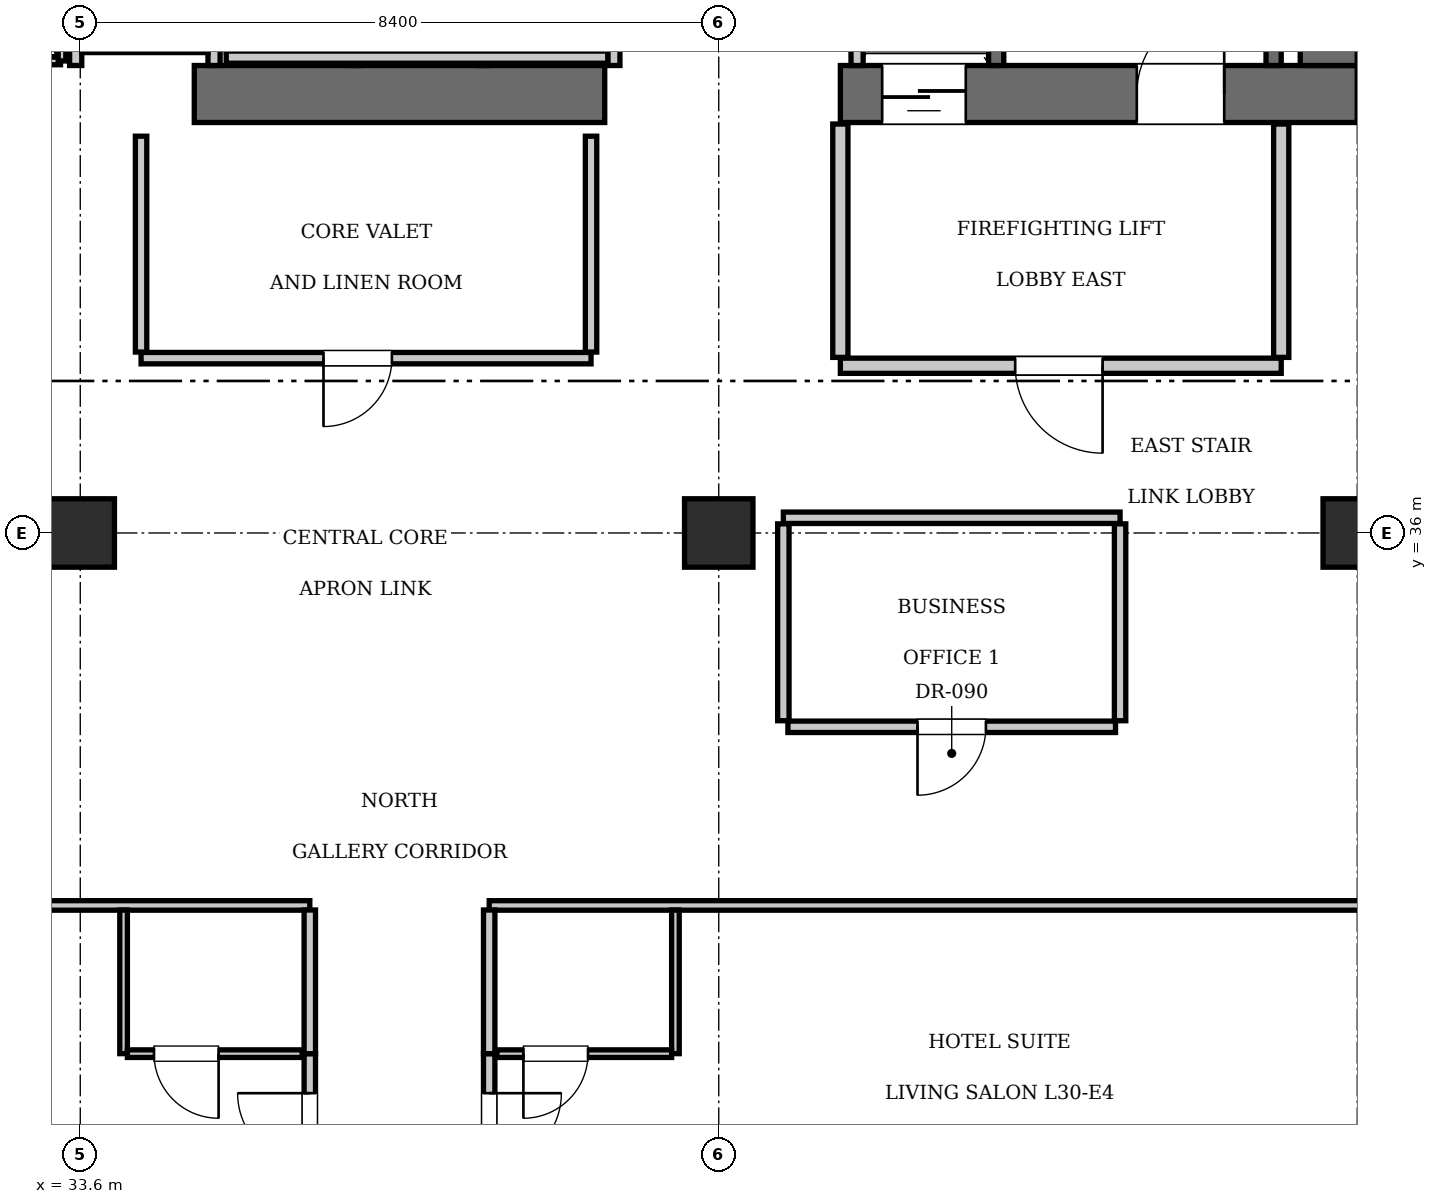
"""IFC4 building model, lengths in metres.
Left out: names, types, materials, properties, quantities, classifications, styles, units other than length and angle.
Written with IfcOpenShell. Run it as: python <this file> out.ifc"""

import sys

from ifc_helpers import new_model, si_unit, direction, frame, frame_2d, origin, origin_2d, place, context, subcontext, project, spatial, rectangle, extrude, element, fill, save


model = new_model("IFC4")
c1 = context("Model", 3, precision=1e-05, world=origin(), true_north=direction((0.0, 1.0)))
c2 = subcontext(c1, "Body", "Model", "MODEL_VIEW")
j1 = project(units=[si_unit("LENGTHUNIT", "METRE"), si_unit("PLANEANGLEUNIT", "RADIAN")], contexts=[c1])
p1 = place(None, origin())
s1 = spatial("IfcSite", under=j1, at=p1, CompositionType="ELEMENT")
p2 = place(p1, origin())
s2 = spatial("IfcBuilding", under=s1, at=p2, CompositionType="ELEMENT")
p3 = place(p2, frame((0.0, 0.0, 127.4)))
s3 = spatial("IfcBuildingStorey", under=s2, at=p3, CompositionType="ELEMENT", Elevation=127.4)
p4 = place(p3, frame((35.1, 41.775, 0.0), z_axis=(0.0, 0.0, 1.0), x_axis=(1.0, 0.0, 0.0)))
e1 = element("IfcWall", 1, at=p4, inside=s3, PredefinedType="SHEAR", context=c2, shape_type="SweptSolid", body=[
    extrude(rectangle(XDim=5.4, YDim=0.75, at=frame_2d((2.7, 0.0))), origin(), (0.0, 0.0, 1.0), 3.85),
])
p5 = place(p3, frame((43.6, 41.775, 0.0), z_axis=(0.0, 0.0, 1.0), x_axis=(1.0, 0.0, 0.0)))
e2 = element("IfcWall", 2, at=p5, inside=s3, PredefinedType="SHEAR", context=c2, shape_type="SweptSolid", body=[
    extrude(rectangle(XDim=6.8, YDim=0.75, at=frame_2d((3.4, 0.0))), origin(), (0.0, 0.0, 1.0), 3.85),
])
p6 = place(p5, frame((3.9, 0.0, 0.0)))
e3 = element("IfcOpeningElement", 3, at=p6, cuts=e2, PredefinedType="OPENING", context=c2, shape_type="SweptSolid", body=[
    extrude(rectangle(XDim=1.15, YDim=2.15, at=frame_2d((0.575, 1.075))), frame((0.0, 0.385, 0.0), z_axis=(0.0, -1.0, 0.0), x_axis=(1.0, 0.0, 0.0)), (0.0, 0.0, 1.0), 0.77),
])
p7 = place(p5, frame((0.55, 0.0, 0.0)))
e4 = element("IfcOpeningElement", 4, at=p7, cuts=e2, PredefinedType="OPENING", context=c2, shape_type="SweptSolid", body=[
    extrude(rectangle(XDim=1.1, YDim=2.2, at=frame_2d((0.55, 1.1))), frame((0.0, 0.385, 0.0), z_axis=(0.0, -1.0, 0.0), x_axis=(1.0, 0.0, 0.0)), (0.0, 0.0, 1.0), 0.77),
])
p8 = place(p3, frame((50.025, 42.15, 0.0), z_axis=(0.0, 0.0, 1.0), x_axis=(0.0, 1.0, 0.0)))
e5 = element("IfcWall", 5, at=p8, inside=s3, PredefinedType="SHEAR", context=c2, shape_type="SweptSolid", body=[
    extrude(rectangle(XDim=1.9, YDim=0.75, at=frame_2d((0.95, 0.0))), origin(), (0.0, 0.0, 1.0), 3.85),
])
for number, where, z_axis, x_axis in (
    (6, (33.6, 36.0, 0.0), (0.0, 0.0, 1.0), (1.0, 0.0, 0.0)),
    (7, (42.0, 36.0, 0.0), (0.0, 0.0, 1.0), (1.0, 0.0, 0.0)),
    (8, (50.4, 36.0, 0.0), (0.0, 0.0, 1.0), (1.0, 0.0, 0.0)),
):
    element("IfcColumn", number, at=place(p3, frame(where, z_axis=z_axis, x_axis=x_axis)), inside=s3, PredefinedType="COLUMN", context=c2, shape_type="SweptSolid", body=[
        extrude(rectangle(XDim=0.9, YDim=0.9, at=origin_2d()), origin(), (0.0, 0.0, 1.0), 3.85),
    ])
p9 = place(p3, frame((45.65, 42.15, 0.0), z_axis=(0.0, 0.0, 1.0), x_axis=(0.0, 1.0, 0.0)))
e9 = element("IfcWall", 9, at=p9, inside=s3, PredefinedType="SOLIDWALL", context=c2, shape_type="SweptSolid", body=[
    extrude(rectangle(XDim=9.0, YDim=0.2, at=frame_2d((4.5, 0.0))), origin(), (0.0, 0.0, 1.0), 3.61),
])
p10 = place(p3, frame((49.3, 42.15, 0.0), z_axis=(0.0, 0.0, 1.0), x_axis=(0.0, 1.0, 0.0)))
e10 = element("IfcWall", 10, at=p10, inside=s3, PredefinedType="SOLIDWALL", context=c2, shape_type="SweptSolid", body=[
    extrude(rectangle(XDim=1.87, YDim=0.2, at=frame_2d((0.935, 0.0))), origin(), (0.0, 0.0, 1.0), 3.61),
])
p11 = place(p3, frame((43.82, 42.15, 0.0), z_axis=(0.0, 0.0, 1.0), x_axis=(0.0, 1.0, 0.0)))
e11 = element("IfcWall", 11, at=p11, inside=s3, PredefinedType="SOLIDWALL", context=c2, shape_type="SweptSolid", body=[
    extrude(rectangle(XDim=2.59, YDim=0.16, at=frame_2d((1.295, 0.0))), origin(), (0.0, 0.0, 1.0), 3.61),
])
for number, where, z_axis, x_axis in (
    (12, (37.2, 42.15, 0.0), (0.0, 0.0, 1.0), (0.0, 1.0, 0.0)),
    (13, (38.9, 42.15, 0.0), (0.0, 0.0, 1.0), (0.0, 1.0, 0.0)),
    (14, (40.62, 42.15, 0.0), (0.0, 0.0, 1.0), (0.0, 1.0, 0.0)),
):
    element("IfcWall", number, at=place(p3, frame(where, z_axis=z_axis, x_axis=x_axis)), inside=s3, PredefinedType="SOLIDWALL", context=c2, shape_type="SweptSolid", body=[
        extrude(rectangle(XDim=2.2, YDim=0.16, at=frame_2d((1.1, 0.0))), origin(), (0.0, 0.0, 1.0), 3.61),
    ])
p12 = place(p3, frame((35.52, 42.26, 0.0), z_axis=(0.0, 0.0, 1.0), x_axis=(1.0, 0.0, 0.0)))
e15 = element("IfcWall", 15, at=p12, inside=s3, PredefinedType="SOLIDWALL", context=c2, shape_type="SweptSolid", body=[
    extrude(rectangle(XDim=5.02, YDim=0.16, at=frame_2d((2.51, 0.0))), origin(), (0.0, 0.0, 1.0), 3.61),
])
for number, where, z_axis, x_axis in (
    (16, (33.54, 42.15, 0.0), (0.0, 0.0, 1.0), (0.0, 1.0, 0.0)),
    (17, (35.36, 42.15, 0.0), (0.0, 0.0, 1.0), (0.0, 1.0, 0.0)),
):
    element("IfcWall", number, at=place(p3, frame(where, z_axis=z_axis, x_axis=x_axis)), inside=s3, PredefinedType="SOLIDWALL", context=c2, shape_type="SweptSolid", body=[
        extrude(rectangle(XDim=2.25, YDim=0.16, at=frame_2d((1.125, 0.0))), origin(), (0.0, 0.0, 1.0), 3.61),
    ])
p13 = place(p3, frame((33.62, 42.4, 0.0), z_axis=(0.0, 0.0, 1.0), x_axis=(1.0, 0.0, 0.0)))
e18 = element("IfcWall", 18, at=p13, inside=s3, PredefinedType="SOLIDWALL", context=c2, shape_type="SweptSolid", body=[
    extrude(rectangle(XDim=1.66, YDim=0.16, at=frame_2d((0.83, 0.0))), origin(), (0.0, 0.0, 1.0), 3.61),
])
p14 = place(p3, frame((43.6, 38.2, 0.0), z_axis=(0.0, 0.0, 1.0), x_axis=(1.0, 0.0, 0.0)))
e19 = element("IfcWall", 19, at=p14, inside=s3, PredefinedType="PARTITIONING", context=c2, shape_type="SweptSolid", body=[
    extrude(rectangle(XDim=5.8, YDim=0.2, at=frame_2d((2.9, 0.0))), origin(), (0.0, 0.0, 1.0), 3.61),
])
p15 = place(p14, frame((2.3, 0.0, 0.0)))
e20 = element("IfcOpeningElement", 20, at=p15, cuts=e19, PredefinedType="OPENING", context=c2, shape_type="SweptSolid", body=[
    extrude(rectangle(XDim=1.15, YDim=2.15, at=frame_2d((0.575, 1.075))), frame((0.0, 0.11, 0.0), z_axis=(0.0, -1.0, 0.0), x_axis=(1.0, 0.0, 0.0)), (0.0, 0.0, 1.0), 0.22),
])
for number, where, z_axis, x_axis in (
    (21, (43.6, 38.31, 0.0), (0.0, 0.0, 1.0), (0.0, 1.0, 0.0)),
    (22, (49.4, 38.31, 0.0), (0.0, 0.0, 1.0), (0.0, 1.0, 0.0)),
):
    element("IfcWall", number, at=place(p3, frame(where, z_axis=z_axis, x_axis=x_axis)), inside=s3, PredefinedType="PARTITIONING", context=c2, shape_type="SweptSolid", body=[
        extrude(rectangle(XDim=3.07, YDim=0.2, at=frame_2d((1.535, 0.0))), origin(), (0.0, 0.0, 1.0), 3.61),
    ])
p16 = place(p3, frame((32.02, 42.21, 0.0), z_axis=(0.0, 0.0, 1.0), x_axis=(1.0, 0.0, 0.0)))
e23 = element("IfcWall", 23, at=p16, inside=s3, PredefinedType="PARTITIONING", context=c2, shape_type="SweptSolid", body=[
    extrude(rectangle(XDim=1.32, YDim=0.1, at=frame_2d((0.66, 0.0))), origin(), (0.0, 0.0, 1.0), 3.61),
])
p17 = place(p16, frame((0.24, 0.0, 0.0)))
e24 = element("IfcOpeningElement", 24, at=p17, cuts=e23, PredefinedType="OPENING", context=c2, shape_type="SweptSolid", body=[
    extrude(rectangle(XDim=0.8, YDim=2.05, at=frame_2d((0.4, 1.025))), frame((0.0, 0.06, 0.0), z_axis=(0.0, -1.0, 0.0), x_axis=(1.0, 0.0, 0.0)), (0.0, 0.0, 1.0), 0.12),
])
p18 = place(p3, frame((33.36, 42.21, 0.0), z_axis=(0.0, 0.0, 1.0), x_axis=(0.0, 1.0, 0.0)))
e25 = element("IfcWall", 25, at=p18, inside=s3, PredefinedType="PARTITIONING", context=c2, shape_type="SweptSolid", body=[
    extrude(rectangle(XDim=2.73, YDim=0.1, at=frame_2d((1.365, 0.0))), origin(), (0.0, 0.0, 1.0), 3.61),
])
p19 = place(p3, frame((34.4, 38.3, 0.0), z_axis=(0.0, 0.0, 1.0), x_axis=(1.0, 0.0, 0.0)))
e26 = element("IfcWall", 26, at=p19, inside=s3, PredefinedType="PARTITIONING", context=c2, shape_type="SweptSolid", body=[
    extrude(rectangle(XDim=5.92, YDim=0.15, at=frame_2d((2.96, 0.0))), origin(), (0.0, 0.0, 1.0), 3.61),
])
p20 = place(p19, frame((2.4, 0.0, 0.0)))
e27 = element("IfcOpeningElement", 27, at=p20, cuts=e26, PredefinedType="OPENING", context=c2, shape_type="SweptSolid", body=[
    extrude(rectangle(XDim=0.9, YDim=2.1, at=frame_2d((0.45, 1.05))), frame((0.0, 0.085, 0.0), z_axis=(0.0, -1.0, 0.0), x_axis=(1.0, 0.0, 0.0)), (0.0, 0.0, 1.0), 0.17),
])
for number, where, z_axis, x_axis in (
    (28, (34.4, 38.38, 0.0), (0.0, 0.0, 1.0), (0.0, 1.0, 0.0)),
    (29, (40.32, 38.38, 0.0), (0.0, 0.0, 1.0), (0.0, 1.0, 0.0)),
):
    element("IfcWall", number, at=place(p3, frame(where, z_axis=z_axis, x_axis=x_axis)), inside=s3, PredefinedType="PARTITIONING", context=c2, shape_type="SweptSolid", body=[
        extrude(rectangle(XDim=2.84, YDim=0.15, at=frame_2d((1.42, 0.0))), origin(), (0.0, 0.0, 1.0), 3.61),
    ])
p21 = place(p3, frame((42.85, 36.2, 0.0), z_axis=(0.0, 0.0, 1.0), x_axis=(1.0, 0.0, 0.0)))
e30 = element("IfcWall", 30, at=p21, inside=s3, PredefinedType="PARTITIONING", context=c2, shape_type="SweptSolid", body=[
    extrude(rectangle(XDim=4.43, YDim=0.15, at=frame_2d((2.215, 0.0))), origin(), (0.0, 0.0, 1.0), 3.61),
])
for number, where, z_axis, x_axis in (
    (31, (42.85, 33.53, 0.0), (0.0, 0.0, 1.0), (0.0, 1.0, 0.0)),
    (32, (47.28, 33.53, 0.0), (0.0, 0.0, 1.0), (0.0, 1.0, 0.0)),
):
    element("IfcWall", number, at=place(p3, frame(where, z_axis=z_axis, x_axis=x_axis)), inside=s3, PredefinedType="PARTITIONING", context=c2, shape_type="SweptSolid", body=[
        extrude(rectangle(XDim=2.59, YDim=0.15, at=frame_2d((1.295, 0.0))), origin(), (0.0, 0.0, 1.0), 3.61),
    ])
p22 = place(p3, frame((42.91, 33.45, 0.0), z_axis=(0.0, 0.0, 1.0), x_axis=(1.0, 0.0, 0.0)))
e33 = element("IfcWall", 33, at=p22, inside=s3, PredefinedType="PARTITIONING", context=c2, shape_type="SweptSolid", body=[
    extrude(rectangle(XDim=4.31, YDim=0.15, at=frame_2d((2.155, 0.0))), origin(), (0.0, 0.0, 1.0), 3.61),
])
p23 = place(p22, frame((1.705, 0.0, 0.0)))
e34 = element("IfcOpeningElement", 34, at=p23, cuts=e33, PredefinedType="OPENING", context=c2, shape_type="SweptSolid", body=[
    extrude(rectangle(XDim=0.9, YDim=2.1, at=frame_2d((0.45, 1.05))), frame((0.0, 0.085, 0.0), z_axis=(0.0, -1.0, 0.0), x_axis=(1.0, 0.0, 0.0)), (0.0, 0.0, 1.0), 0.17),
])
p24 = place(p3, frame((13.2, 31.1, 0.0), z_axis=(0.0, 0.0, 1.0), x_axis=(1.0, 0.0, 0.0)))
e35 = element("IfcWall", 35, at=p24, inside=s3, PredefinedType="PARTITIONING", context=c2, shape_type="SweptSolid", body=[
    extrude(rectangle(XDim=23.42, YDim=0.125, at=frame_2d((11.71, 0.0))), origin(), (0.0, 0.0, 1.0), 3.61),
])
p25 = place(p3, frame((38.98, 31.1, 0.0), z_axis=(0.0, 0.0, 1.0), x_axis=(1.0, 0.0, 0.0)))
e36 = element("IfcWall", 36, at=p25, inside=s3, PredefinedType="PARTITIONING", context=c2, shape_type="SweptSolid", body=[
    extrude(rectangle(XDim=23.42, YDim=0.125, at=frame_2d((11.71, 0.0))), origin(), (0.0, 0.0, 1.0), 3.61),
])
p26 = place(p3, frame((36.62, 27.16, 0.0), z_axis=(0.0, 0.0, 1.0), x_axis=(0.0, 1.0, 0.0)))
e37 = element("IfcWall", 37, at=p26, inside=s3, PredefinedType="PARTITIONING", context=c2, shape_type="SweptSolid", body=[
    extrude(rectangle(XDim=1.99, YDim=0.15, at=frame_2d((0.995, 0.0))), origin(), (0.0, 0.0, 1.0), 3.61),
])
p27 = place(p26, frame((0.52, 0.0, 0.0)))
e38 = element("IfcOpeningElement", 38, at=p27, cuts=e37, PredefinedType="OPENING", context=c2, shape_type="SweptSolid", body=[
    extrude(rectangle(XDim=0.95, YDim=2.15, at=frame_2d((0.475, 1.075))), frame((0.0, 0.085, 0.0), z_axis=(0.0, -1.0, 0.0), x_axis=(1.0, 0.0, 0.0)), (0.0, 0.0, 1.0), 0.17),
])
p28 = place(p3, frame((36.62, 29.15, 0.0), z_axis=(0.0, 0.0, 1.0), x_axis=(0.0, 1.0, 0.0)))
e39 = element("IfcWall", 39, at=p28, inside=s3, PredefinedType="PARTITIONING", context=c2, shape_type="SweptSolid", body=[
    extrude(rectangle(XDim=1.89, YDim=0.15, at=frame_2d((0.945, 0.0))), origin(), (0.0, 0.0, 1.0), 3.61),
])
p29 = place(p3, frame((34.17, 29.15, 0.0), z_axis=(0.0, 0.0, 1.0), x_axis=(0.0, 1.0, 0.0)))
e40 = element("IfcWall", 40, at=p29, inside=s3, PredefinedType="PARTITIONING", context=c2, shape_type="SweptSolid", body=[
    extrude(rectangle(XDim=1.89, YDim=0.1, at=frame_2d((0.945, 0.0))), origin(), (0.0, 0.0, 1.0), 3.61),
])
p30 = place(p3, frame((34.22, 29.15, 0.0), z_axis=(0.0, 0.0, 1.0), x_axis=(1.0, 0.0, 0.0)))
e41 = element("IfcWall", 41, at=p30, inside=s3, PredefinedType="PARTITIONING", context=c2, shape_type="SweptSolid", body=[
    extrude(rectangle(XDim=2.3, YDim=0.1, at=frame_2d((1.15, 0.0))), origin(), (0.0, 0.0, 1.0), 3.61),
])
p31 = place(p30, frame((0.35, 0.0, 0.0)))
e42 = element("IfcOpeningElement", 42, at=p31, cuts=e41, PredefinedType="OPENING", context=c2, shape_type="SweptSolid", body=[
    extrude(rectangle(XDim=0.85, YDim=2.1, at=frame_2d((0.425, 1.05))), frame((0.0, 0.06, 0.0), z_axis=(0.0, -1.0, 0.0), x_axis=(1.0, 0.0, 0.0)), (0.0, 0.0, 1.0), 0.12),
])
p32 = place(p3, frame((38.98, 27.16, 0.0), z_axis=(0.0, 0.0, 1.0), x_axis=(0.0, 1.0, 0.0)))
e43 = element("IfcWall", 43, at=p32, inside=s3, PredefinedType="PARTITIONING", context=c2, shape_type="SweptSolid", body=[
    extrude(rectangle(XDim=1.99, YDim=0.15, at=frame_2d((0.995, 0.0))), origin(), (0.0, 0.0, 1.0), 3.61),
])
p33 = place(p32, frame((0.52, 0.0, 0.0)))
e44 = element("IfcOpeningElement", 44, at=p33, cuts=e43, PredefinedType="OPENING", context=c2, shape_type="SweptSolid", body=[
    extrude(rectangle(XDim=0.95, YDim=2.15, at=frame_2d((0.475, 1.075))), frame((0.0, 0.085, 0.0), z_axis=(0.0, -1.0, 0.0), x_axis=(1.0, 0.0, 0.0)), (0.0, 0.0, 1.0), 0.17),
])
p34 = place(p3, frame((38.98, 29.15, 0.0), z_axis=(0.0, 0.0, 1.0), x_axis=(0.0, 1.0, 0.0)))
e45 = element("IfcWall", 45, at=p34, inside=s3, PredefinedType="PARTITIONING", context=c2, shape_type="SweptSolid", body=[
    extrude(rectangle(XDim=1.89, YDim=0.15, at=frame_2d((0.945, 0.0))), origin(), (0.0, 0.0, 1.0), 3.61),
])
p35 = place(p3, frame((41.43, 29.15, 0.0), z_axis=(0.0, 0.0, 1.0), x_axis=(0.0, 1.0, 0.0)))
e46 = element("IfcWall", 46, at=p35, inside=s3, PredefinedType="PARTITIONING", context=c2, shape_type="SweptSolid", body=[
    extrude(rectangle(XDim=1.89, YDim=0.1, at=frame_2d((0.945, 0.0))), origin(), (0.0, 0.0, 1.0), 3.61),
])
p36 = place(p3, frame((39.08, 29.15, 0.0), z_axis=(0.0, 0.0, 1.0), x_axis=(1.0, 0.0, 0.0)))
e47 = element("IfcWall", 47, at=p36, inside=s3, PredefinedType="PARTITIONING", context=c2, shape_type="SweptSolid", body=[
    extrude(rectangle(XDim=2.3, YDim=0.1, at=frame_2d((1.15, 0.0))), origin(), (0.0, 0.0, 1.0), 3.61),
])
p37 = place(p36, frame((0.35, 0.0, 0.0)))
e48 = element("IfcOpeningElement", 48, at=p37, cuts=e47, PredefinedType="OPENING", context=c2, shape_type="SweptSolid", body=[
    extrude(rectangle(XDim=0.85, YDim=2.1, at=frame_2d((0.425, 1.05))), frame((0.0, 0.06, 0.0), z_axis=(0.0, -1.0, 0.0), x_axis=(1.0, 0.0, 0.0)), (0.0, 0.0, 1.0), 0.12),
])
p38 = place(p6, origin())
e49 = element("IfcDoor", 49, at=p38, inside=s3, OperationType="SINGLE_SWING_RIGHT", PredefinedType="DOOR", context=c2, shape_type="SweptSolid", body=[
    extrude(rectangle(XDim=1.15, YDim=2.15, at=frame_2d((0.575, 1.075))), frame((0.0, 0.025, 0.0), z_axis=(0.0, -1.0, 0.0), x_axis=(1.0, 0.0, 0.0)), (0.0, 0.0, 1.0), 0.05),
])
fill(e3, e49)
p39 = place(p7, frame((1.1, 0.0, 0.0), z_axis=(0.0, 0.0, 1.0), x_axis=(-1.0, 0.0, 0.0)))
e50 = element("IfcDoor", 50, at=p39, inside=s3, OperationType="SLIDING_TO_LEFT", PredefinedType="DOOR", context=c2, shape_type="SweptSolid", body=[
    extrude(rectangle(XDim=1.1, YDim=2.2, at=frame_2d((0.55, 1.1))), frame((0.0, 0.025, 0.0), z_axis=(0.0, -1.0, 0.0), x_axis=(1.0, 0.0, 0.0)), (0.0, 0.0, 1.0), 0.05),
])
fill(e4, e50)
p40 = place(p15, frame((1.15, 0.0, 0.0), z_axis=(0.0, 0.0, 1.0), x_axis=(-1.0, 0.0, 0.0)))
e51 = element("IfcDoor", 51, at=p40, inside=s3, OperationType="SINGLE_SWING_LEFT", PredefinedType="DOOR", context=c2, shape_type="SweptSolid", body=[
    extrude(rectangle(XDim=1.15, YDim=2.15, at=frame_2d((0.575, 1.075))), frame((0.0, 0.025, 0.0), z_axis=(0.0, -1.0, 0.0), x_axis=(1.0, 0.0, 0.0)), (0.0, 0.0, 1.0), 0.05),
])
fill(e20, e51)
p41 = place(p20, frame((0.9, 0.0, 0.0), z_axis=(0.0, 0.0, 1.0), x_axis=(-1.0, 0.0, 0.0)))
e52 = element("IfcDoor", 52, at=p41, inside=s3, OperationType="SINGLE_SWING_RIGHT", PredefinedType="DOOR", context=c2, shape_type="SweptSolid", body=[
    extrude(rectangle(XDim=0.9, YDim=2.1, at=frame_2d((0.45, 1.05))), frame((0.0, 0.025, 0.0), z_axis=(0.0, -1.0, 0.0), x_axis=(1.0, 0.0, 0.0)), (0.0, 0.0, 1.0), 0.05),
])
fill(e27, e52)
p42 = place(p23, frame((0.9, 0.0, 0.0), z_axis=(0.0, 0.0, 1.0), x_axis=(-1.0, 0.0, 0.0)))
e53 = element("IfcDoor", 53, at=p42, inside=s3, OperationType="SINGLE_SWING_RIGHT", PredefinedType="DOOR", context=c2, shape_type="SweptSolid", body=[
    extrude(rectangle(XDim=0.9, YDim=2.1, at=frame_2d((0.45, 1.05))), frame((0.0, 0.025, 0.0), z_axis=(0.0, -1.0, 0.0), x_axis=(1.0, 0.0, 0.0)), (0.0, 0.0, 1.0), 0.05),
])
fill(e34, e53)
p43 = place(p31, frame((0.85, 0.0, 0.0), z_axis=(0.0, 0.0, 1.0), x_axis=(-1.0, 0.0, 0.0)))
e54 = element("IfcDoor", 54, at=p43, inside=s3, OperationType="SINGLE_SWING_LEFT", PredefinedType="DOOR", context=c2, shape_type="SweptSolid", body=[
    extrude(rectangle(XDim=0.85, YDim=2.1, at=frame_2d((0.425, 1.05))), frame((0.0, 0.025, 0.0), z_axis=(0.0, -1.0, 0.0), x_axis=(1.0, 0.0, 0.0)), (0.0, 0.0, 1.0), 0.05),
])
fill(e42, e54)
p44 = place(p27, origin())
e55 = element("IfcDoor", 55, at=p44, inside=s3, OperationType="SINGLE_SWING_RIGHT", PredefinedType="DOOR", context=c2, shape_type="SweptSolid", body=[
    extrude(rectangle(XDim=0.95, YDim=2.15, at=frame_2d((0.475, 1.075))), frame((0.0, 0.025, 0.0), z_axis=(0.0, -1.0, 0.0), x_axis=(1.0, 0.0, 0.0)), (0.0, 0.0, 1.0), 0.05),
])
fill(e38, e55)
p45 = place(p37, frame((0.85, 0.0, 0.0), z_axis=(0.0, 0.0, 1.0), x_axis=(-1.0, 0.0, 0.0)))
e56 = element("IfcDoor", 56, at=p45, inside=s3, OperationType="SINGLE_SWING_RIGHT", PredefinedType="DOOR", context=c2, shape_type="SweptSolid", body=[
    extrude(rectangle(XDim=0.85, YDim=2.1, at=frame_2d((0.425, 1.05))), frame((0.0, 0.025, 0.0), z_axis=(0.0, -1.0, 0.0), x_axis=(1.0, 0.0, 0.0)), (0.0, 0.0, 1.0), 0.05),
])
fill(e48, e56)
p46 = place(p33, frame((0.95, 0.0, 0.0), z_axis=(0.0, 0.0, 1.0), x_axis=(-1.0, 0.0, 0.0)))
e57 = element("IfcDoor", 57, at=p46, inside=s3, OperationType="SINGLE_SWING_LEFT", PredefinedType="DOOR", context=c2, shape_type="SweptSolid", body=[
    extrude(rectangle(XDim=0.95, YDim=2.15, at=frame_2d((0.475, 1.075))), frame((0.0, 0.025, 0.0), z_axis=(0.0, -1.0, 0.0), x_axis=(1.0, 0.0, 0.0)), (0.0, 0.0, 1.0), 0.05),
])
fill(e44, e57)
save(model, sys.argv[1])
